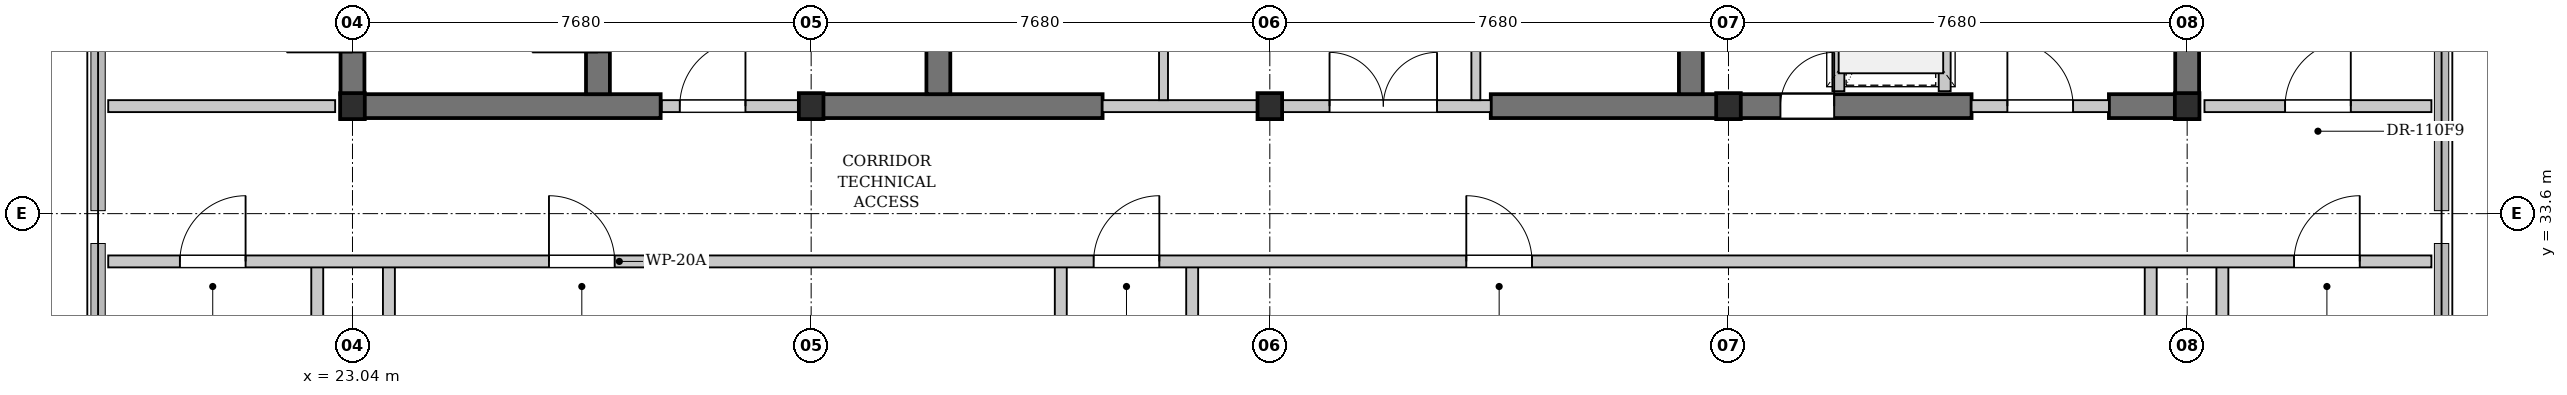
"""IFC4 building model, lengths in metres.
Left out: names, types, materials, properties, quantities, classifications, styles, units other than length and angle.
Written with IfcOpenShell. Run it as: python <this file> out.ifc"""

import sys

from ifc_helpers import new_model, si_unit, direction, frame, frame_2d, origin, origin_2d, place, context, subcontext, project, spatial, rectangle, i_section, extrude, element, fill, save


model = new_model("IFC4")
c1 = context("Model", 3, precision=1e-05, world=origin(), true_north=direction((0.0, 1.0)))
c2 = subcontext(c1, "Body", "Model", "MODEL_VIEW")
j1 = project(units=[si_unit("LENGTHUNIT", "METRE"), si_unit("PLANEANGLEUNIT", "RADIAN")], contexts=[c1])
p1 = place(None, origin())
s1 = spatial("IfcSite", under=j1, at=p1, CompositionType="ELEMENT")
p2 = place(p1, origin())
s2 = spatial("IfcBuilding", under=s1, at=p2, CompositionType="ELEMENT")
p3 = place(p2, frame((0.0, 0.0, 247.4)))
s3 = spatial("IfcBuildingStorey", under=s2, at=p3, CompositionType="ELEMENT", Elevation=247.4)
p4 = place(p3, frame((22.84, 35.4, 0.0), z_axis=(0.0, 0.0, 1.0), x_axis=(1.0, 0.0, 0.0)))
e1 = element("IfcWall", 1, at=p4, inside=s3, PredefinedType="SHEAR", context=c2, shape_type="SweptSolid", body=[
    extrude(rectangle(XDim=5.36, YDim=0.4, at=frame_2d((2.68, 0.0))), origin(), (0.0, 0.0, 1.0), 3.68),
])
p5 = place(p3, frame((30.72, 35.4, 0.0), z_axis=(0.0, 0.0, 1.0), x_axis=(1.0, 0.0, 0.0)))
e2 = element("IfcWall", 2, at=p5, inside=s3, PredefinedType="SHEAR", context=c2, shape_type="SweptSolid", body=[
    extrude(rectangle(XDim=4.88, YDim=0.4, at=frame_2d((2.44, 0.0))), origin(), (0.0, 0.0, 1.0), 3.68),
])
p6 = place(p3, frame((42.1, 35.4, 0.0), z_axis=(0.0, 0.0, 1.0), x_axis=(1.0, 0.0, 0.0)))
e3 = element("IfcWall", 3, at=p6, inside=s3, PredefinedType="SHEAR", context=c2, shape_type="SweptSolid", body=[
    extrude(rectangle(XDim=8.05, YDim=0.4, at=frame_2d((4.025, 0.0))), origin(), (0.0, 0.0, 1.0), 3.68),
])
p7 = place(p6, frame((4.85, 0.0, 0.0)))
e4 = element("IfcOpeningElement", 4, at=p7, cuts=e3, PredefinedType="OPENING", context=c2, shape_type="SweptSolid", body=[
    extrude(rectangle(XDim=0.9, YDim=2.15, at=frame_2d((0.45, 1.075))), frame((0.0, 0.21, 0.0), z_axis=(0.0, -1.0, 0.0), x_axis=(1.0, 0.0, 0.0)), (0.0, 0.0, 1.0), 0.42),
])
p8 = place(p3, frame((52.45, 35.4, 0.0), z_axis=(0.0, 0.0, 1.0), x_axis=(1.0, 0.0, 0.0)))
e5 = element("IfcWall", 5, at=p8, inside=s3, PredefinedType="SHEAR", context=c2, shape_type="SweptSolid", body=[
    extrude(rectangle(XDim=1.51, YDim=0.4, at=frame_2d((0.755, 0.0))), origin(), (0.0, 0.0, 1.0), 3.68),
])
p9 = place(p3, frame((23.04, 35.6, 0.0), z_axis=(0.0, 0.0, 1.0), x_axis=(0.0, 1.0, 0.0)))
e6 = element("IfcWall", 6, at=p9, inside=s3, PredefinedType="SHEAR", context=c2, shape_type="SweptSolid", body=[
    extrude(rectangle(XDim=10.4, YDim=0.4, at=frame_2d((5.2, 0.0))), origin(), (0.0, 0.0, 1.0), 3.68),
])
p10 = place(p9, frame((0.7, 0.0, 0.0)))
e7 = element("IfcOpeningElement", 7, at=p10, cuts=e6, PredefinedType="OPENING", context=c2, shape_type="SweptSolid", body=[
    extrude(rectangle(XDim=1.1, YDim=2.15, at=frame_2d((0.55, 1.075))), frame((0.0, 0.21, 0.0), z_axis=(0.0, -1.0, 0.0), x_axis=(1.0, 0.0, 0.0)), (0.0, 0.0, 1.0), 0.42),
])
p11 = place(p3, frame((27.15, 35.6, 0.0), z_axis=(0.0, 0.0, 1.0), x_axis=(0.0, 1.0, 0.0)))
e8 = element("IfcWall", 8, at=p11, inside=s3, PredefinedType="SHEAR", context=c2, shape_type="SweptSolid", body=[
    extrude(rectangle(XDim=10.4, YDim=0.4, at=frame_2d((5.2, 0.0))), origin(), (0.0, 0.0, 1.0), 3.68),
])
p12 = place(p11, frame((0.7, 0.0, 0.0)))
e9 = element("IfcOpeningElement", 9, at=p12, cuts=e8, PredefinedType="OPENING", context=c2, shape_type="SweptSolid", body=[
    extrude(rectangle(XDim=1.1, YDim=2.15, at=frame_2d((0.55, 1.075))), frame((0.0, 0.21, 0.0), z_axis=(0.0, -1.0, 0.0), x_axis=(1.0, 0.0, 0.0)), (0.0, 0.0, 1.0), 0.42),
])
for number, where, z_axis, x_axis in (
    (10, (32.85, 35.6, 0.0), (0.0, 0.0, 1.0), (0.0, 1.0, 0.0)),
    (11, (45.45, 35.6, 0.0), (0.0, 0.0, 1.0), (0.0, 1.0, 0.0)),
    (12, (53.76, 35.6, 0.0), (0.0, 0.0, 1.0), (0.0, 1.0, 0.0)),
):
    element("IfcWall", number, at=place(p3, frame(where, z_axis=z_axis, x_axis=x_axis)), inside=s3, PredefinedType="SHEAR", context=c2, shape_type="SweptSolid", body=[
        extrude(rectangle(XDim=10.4, YDim=0.4, at=frame_2d((5.2, 0.0))), origin(), (0.0, 0.0, 1.0), 3.68),
    ])
for number, where, z_axis, x_axis in (
    (13, (23.04, 35.4, 0.0), (0.0, 0.0, 1.0), (1.0, 0.0, 0.0)),
    (14, (30.72, 35.4, 0.0), (0.0, 0.0, 1.0), (1.0, 0.0, 0.0)),
    (15, (38.4, 35.4, 0.0), (0.0, 0.0, 1.0), (1.0, 0.0, 0.0)),
    (16, (46.08, 35.4, 0.0), (0.0, 0.0, 1.0), (1.0, 0.0, 0.0)),
    (17, (53.76, 35.4, 0.0), (0.0, 0.0, 1.0), (1.0, 0.0, 0.0)),
):
    element("IfcColumn", number, at=place(p3, frame(where, z_axis=z_axis, x_axis=x_axis)), inside=s3, PredefinedType="COLUMN", context=c2, shape_type="SweptSolid", body=[
        extrude(i_section(OverallWidth=0.412, OverallDepth=0.435, WebThickness=0.036, FlangeThickness=0.058, FilletRadius=0.015, at=origin_2d()), origin(), (0.0, 0.0, 1.0), 3.9),
    ])
p13 = place(p3, frame((28.22, 35.4, 0.0), z_axis=(0.0, 0.0, 1.0), x_axis=(1.0, 0.0, 0.0)))
e18 = element("IfcWall", 18, at=p13, inside=s3, PredefinedType="PARTITIONING", context=c2, shape_type="SweptSolid", body=[
    extrude(rectangle(XDim=2.5, YDim=0.2, at=frame_2d((1.25, 0.0))), origin(), (0.0, 0.0, 1.0), 2.861),
])
p14 = place(p13, frame((0.3, 0.0, 0.0)))
e19 = element("IfcOpeningElement", 19, at=p14, cuts=e18, PredefinedType="OPENING", context=c2, shape_type="SweptSolid", body=[
    extrude(rectangle(XDim=1.1, YDim=2.15, at=frame_2d((0.55, 1.075))), frame((0.0, 0.11, 0.0), z_axis=(0.0, -1.0, 0.0), x_axis=(1.0, 0.0, 0.0)), (0.0, 0.0, 1.0), 0.22),
])
p15 = place(p3, frame((35.6, 35.4, 0.0), z_axis=(0.0, 0.0, 1.0), x_axis=(1.0, 0.0, 0.0)))
e20 = element("IfcWall", 20, at=p15, inside=s3, PredefinedType="PARTITIONING", context=c2, shape_type="SweptSolid", body=[
    extrude(rectangle(XDim=6.5, YDim=0.2, at=frame_2d((3.25, 0.0))), origin(), (0.0, 0.0, 1.0), 2.861),
])
p16 = place(p15, frame((3.8, 0.0, 0.0)))
e21 = element("IfcOpeningElement", 21, at=p16, cuts=e20, PredefinedType="OPENING", context=c2, shape_type="SweptSolid", body=[
    extrude(rectangle(XDim=1.8, YDim=2.3, at=frame_2d((0.9, 1.15))), frame((0.0, 0.11, 0.0), z_axis=(0.0, -1.0, 0.0), x_axis=(1.0, 0.0, 0.0)), (0.0, 0.0, 1.0), 0.22),
])
p17 = place(p3, frame((36.62, 35.5, 0.0), z_axis=(0.0, 0.0, 1.0), x_axis=(0.0, 1.0, 0.0)))
e22 = element("IfcWall", 22, at=p17, inside=s3, PredefinedType="PARTITIONING", context=c2, shape_type="SweptSolid", body=[
    extrude(rectangle(XDim=10.42, YDim=0.15, at=frame_2d((5.21, 0.0))), origin(), (0.0, 0.0, 1.0), 3.68),
])
p18 = place(p17, frame((3.92, 0.0, 0.0)))
e23 = element("IfcOpeningElement", 23, at=p18, cuts=e22, PredefinedType="OPENING", context=c2, shape_type="SweptSolid", body=[
    extrude(rectangle(XDim=0.9, YDim=2.15, at=frame_2d((0.45, 1.075))), frame((0.0, 0.085, 0.0), z_axis=(0.0, -1.0, 0.0), x_axis=(1.0, 0.0, 0.0)), (0.0, 0.0, 1.0), 0.17),
])
p19 = place(p17, frame((5.85, 0.0, 0.0)))
e24 = element("IfcOpeningElement", 24, at=p19, cuts=e22, PredefinedType="OPENING", context=c2, shape_type="SweptSolid", body=[
    extrude(rectangle(XDim=0.9, YDim=2.15, at=frame_2d((0.45, 1.075))), frame((0.0, 0.085, 0.0), z_axis=(0.0, -1.0, 0.0), x_axis=(1.0, 0.0, 0.0)), (0.0, 0.0, 1.0), 0.17),
])
p20 = place(p3, frame((41.85, 35.5, 0.0), z_axis=(0.0, 0.0, 1.0), x_axis=(0.0, 1.0, 0.0)))
e25 = element("IfcWall", 25, at=p20, inside=s3, PredefinedType="PARTITIONING", context=c2, shape_type="SweptSolid", body=[
    extrude(rectangle(XDim=10.42, YDim=0.15, at=frame_2d((5.21, 0.0))), origin(), (0.0, 0.0, 1.0), 3.68),
])
p21 = place(p20, frame((3.92, 0.0, 0.0)))
e26 = element("IfcOpeningElement", 26, at=p21, cuts=e25, PredefinedType="OPENING", context=c2, shape_type="SweptSolid", body=[
    extrude(rectangle(XDim=0.9, YDim=2.15, at=frame_2d((0.45, 1.075))), frame((0.0, 0.085, 0.0), z_axis=(0.0, -1.0, 0.0), x_axis=(1.0, 0.0, 0.0)), (0.0, 0.0, 1.0), 0.17),
])
p22 = place(p20, frame((5.85, 0.0, 0.0)))
e27 = element("IfcOpeningElement", 27, at=p22, cuts=e25, PredefinedType="OPENING", context=c2, shape_type="SweptSolid", body=[
    extrude(rectangle(XDim=0.9, YDim=2.15, at=frame_2d((0.45, 1.075))), frame((0.0, 0.085, 0.0), z_axis=(0.0, -1.0, 0.0), x_axis=(1.0, 0.0, 0.0)), (0.0, 0.0, 1.0), 0.17),
])
p23 = place(p3, frame((50.15, 35.4, 0.0), z_axis=(0.0, 0.0, 1.0), x_axis=(1.0, 0.0, 0.0)))
e28 = element("IfcWall", 28, at=p23, inside=s3, PredefinedType="PARTITIONING", context=c2, shape_type="SweptSolid", body=[
    extrude(rectangle(XDim=2.3, YDim=0.2, at=frame_2d((1.15, 0.0))), origin(), (0.0, 0.0, 1.0), 2.861),
])
p24 = place(p23, frame((0.6, 0.0, 0.0)))
e29 = element("IfcOpeningElement", 29, at=p24, cuts=e28, PredefinedType="OPENING", context=c2, shape_type="SweptSolid", body=[
    extrude(rectangle(XDim=1.1, YDim=2.15, at=frame_2d((0.55, 1.075))), frame((0.0, 0.11, 0.0), z_axis=(0.0, -1.0, 0.0), x_axis=(1.0, 0.0, 0.0)), (0.0, 0.0, 1.0), 0.22),
])
p25 = place(p3, frame((49.7, 35.65, 0.0), z_axis=(0.0, 0.0, 1.0), x_axis=(0.0, 1.0, 0.0)))
e30 = element("IfcWall", 30, at=p25, inside=s3, PredefinedType="PARTITIONING", context=c2, shape_type="SweptSolid", body=[
    extrude(rectangle(XDim=3.15, YDim=0.2, at=frame_2d((1.575, 0.0))), origin(), (0.0, 0.0, 1.0), 3.68),
])
p26 = place(p25, frame((0.85, 0.0, 0.0)))
e31 = element("IfcOpeningElement", 31, at=p26, cuts=e30, PredefinedType="OPENING", context=c2, shape_type="SweptSolid", body=[
    extrude(rectangle(XDim=1.2, YDim=2.2, at=frame_2d((0.6, 1.1))), frame((0.0, 0.11, 0.0), z_axis=(0.0, -1.0, 0.0), x_axis=(1.0, 0.0, 0.0)), (0.0, 0.0, 1.0), 0.22),
])
p27 = place(p3, frame((47.92, 35.65, 0.0), z_axis=(0.0, 0.0, 1.0), x_axis=(0.0, 1.0, 0.0)))
e32 = element("IfcWall", 32, at=p27, inside=s3, PredefinedType="PARTITIONING", context=c2, shape_type="SweptSolid", body=[
    extrude(rectangle(XDim=3.15, YDim=0.2, at=frame_2d((1.575, 0.0))), origin(), (0.0, 0.0, 1.0), 3.68),
])
p28 = place(p3, frame((18.95, 35.4, 0.0), z_axis=(0.0, 0.0, 1.0), x_axis=(1.0, 0.0, 0.0)))
e33 = element("IfcWall", 33, at=p28, inside=s3, PredefinedType="PARTITIONING", context=c2, shape_type="SweptSolid", body=[
    extrude(rectangle(XDim=3.8, YDim=0.2, at=frame_2d((1.9, 0.0))), origin(), (0.0, 0.0, 1.0), 3.68),
])
p29 = place(p3, frame((54.05, 35.4, 0.0), z_axis=(0.0, 0.0, 1.0), x_axis=(1.0, 0.0, 0.0)))
e34 = element("IfcWall", 34, at=p29, inside=s3, PredefinedType="PARTITIONING", context=c2, shape_type="SweptSolid", body=[
    extrude(rectangle(XDim=3.8, YDim=0.2, at=frame_2d((1.9, 0.0))), origin(), (0.0, 0.0, 1.0), 3.68),
])
p30 = place(p29, frame((1.35, 0.0, 0.0)))
e35 = element("IfcOpeningElement", 35, at=p30, cuts=e34, PredefinedType="OPENING", context=c2, shape_type="SweptSolid", body=[
    extrude(rectangle(XDim=1.1, YDim=2.15, at=frame_2d((0.55, 1.075))), frame((0.0, 0.11, 0.0), z_axis=(0.0, -1.0, 0.0), x_axis=(1.0, 0.0, 0.0)), (0.0, 0.0, 1.0), 0.22),
])
for number, where, z_axis, x_axis in (
    (36, (22.45, 24.18, 0.0), (0.0, 0.0, 1.0), (0.0, 1.0, 0.0)),
    (37, (23.65, 24.18, 0.0), (0.0, 0.0, 1.0), (0.0, 1.0, 0.0)),
    (38, (53.15, 24.18, 0.0), (0.0, 0.0, 1.0), (0.0, 1.0, 0.0)),
    (39, (54.35, 24.18, 0.0), (0.0, 0.0, 1.0), (0.0, 1.0, 0.0)),
):
    element("IfcWall", number, at=place(p3, frame(where, z_axis=z_axis, x_axis=x_axis)), inside=s3, PredefinedType="PARTITIONING", context=c2, shape_type="SweptSolid", body=[
        extrude(rectangle(XDim=8.62, YDim=0.2, at=frame_2d((4.31, 0.0))), origin(), (0.0, 0.0, 1.0), 3.68),
    ])
for number, where, z_axis, x_axis in (
    (40, (34.9, 26.85, 0.0), (0.0, 0.0, 1.0), (0.0, 1.0, 0.0)),
    (41, (37.1, 26.85, 0.0), (0.0, 0.0, 1.0), (0.0, 1.0, 0.0)),
):
    element("IfcWall", number, at=place(p3, frame(where, z_axis=z_axis, x_axis=x_axis)), inside=s3, PredefinedType="PARTITIONING", context=c2, shape_type="SweptSolid", body=[
        extrude(rectangle(XDim=5.95, YDim=0.2, at=frame_2d((2.975, 0.0))), origin(), (0.0, 0.0, 1.0), 3.68),
    ])
p31 = place(p3, frame((18.95, 32.8, 0.0), z_axis=(0.0, 0.0, 1.0), x_axis=(1.0, 0.0, 0.0)))
e42 = element("IfcWall", 42, at=p31, inside=s3, PredefinedType="PARTITIONING", context=c2, shape_type="SweptSolid", body=[
    extrude(rectangle(XDim=38.9, YDim=0.2, at=frame_2d((19.45, 0.0))), origin(), (0.0, 0.0, 1.0), 3.68),
])
p32 = place(p31, frame((1.2, 0.0, 0.0)))
e43 = element("IfcOpeningElement", 43, at=p32, cuts=e42, PredefinedType="OPENING", context=c2, shape_type="SweptSolid", body=[
    extrude(rectangle(XDim=1.1, YDim=2.15, at=frame_2d((0.55, 1.075))), frame((0.0, 0.11, 0.0), z_axis=(0.0, -1.0, 0.0), x_axis=(1.0, 0.0, 0.0)), (0.0, 0.0, 1.0), 0.22),
])
p33 = place(p31, frame((7.38, 0.0, 0.0)))
e44 = element("IfcOpeningElement", 44, at=p33, cuts=e42, PredefinedType="OPENING", context=c2, shape_type="SweptSolid", body=[
    extrude(rectangle(XDim=1.1, YDim=2.15, at=frame_2d((0.55, 1.075))), frame((0.0, 0.11, 0.0), z_axis=(0.0, -1.0, 0.0), x_axis=(1.0, 0.0, 0.0)), (0.0, 0.0, 1.0), 0.22),
])
p34 = place(p31, frame((16.5, 0.0, 0.0)))
e45 = element("IfcOpeningElement", 45, at=p34, cuts=e42, PredefinedType="OPENING", context=c2, shape_type="SweptSolid", body=[
    extrude(rectangle(XDim=1.1, YDim=2.15, at=frame_2d((0.55, 1.075))), frame((0.0, 0.11, 0.0), z_axis=(0.0, -1.0, 0.0), x_axis=(1.0, 0.0, 0.0)), (0.0, 0.0, 1.0), 0.22),
])
p35 = place(p31, frame((22.74, 0.0, 0.0)))
e46 = element("IfcOpeningElement", 46, at=p35, cuts=e42, PredefinedType="OPENING", context=c2, shape_type="SweptSolid", body=[
    extrude(rectangle(XDim=1.1, YDim=2.15, at=frame_2d((0.55, 1.075))), frame((0.0, 0.11, 0.0), z_axis=(0.0, -1.0, 0.0), x_axis=(1.0, 0.0, 0.0)), (0.0, 0.0, 1.0), 0.22),
])
p36 = place(p31, frame((36.6, 0.0, 0.0)))
e47 = element("IfcOpeningElement", 47, at=p36, cuts=e42, PredefinedType="OPENING", context=c2, shape_type="SweptSolid", body=[
    extrude(rectangle(XDim=1.1, YDim=2.15, at=frame_2d((0.55, 1.075))), frame((0.0, 0.11, 0.0), z_axis=(0.0, -1.0, 0.0), x_axis=(1.0, 0.0, 0.0)), (0.0, 0.0, 1.0), 0.22),
])
p37 = place(p14, origin())
e48 = element("IfcDoor", 48, at=p37, inside=s3, OperationType="SINGLE_SWING_RIGHT", PredefinedType="DOOR", context=c2, shape_type="SweptSolid", body=[
    extrude(rectangle(XDim=1.1, YDim=2.15, at=frame_2d((0.55, 1.075))), frame((0.0, 0.025, 0.0), z_axis=(0.0, -1.0, 0.0), x_axis=(1.0, 0.0, 0.0)), (0.0, 0.0, 1.0), 0.05),
])
fill(e19, e48)
p38 = place(p16, origin())
e49 = element("IfcDoor", 49, at=p38, inside=s3, OperationType="DOUBLE_DOOR_SINGLE_SWING", PredefinedType="DOOR", context=c2, shape_type="SweptSolid", body=[
    extrude(rectangle(XDim=1.8, YDim=2.3, at=frame_2d((0.9, 1.15))), frame((0.0, 0.025, 0.0), z_axis=(0.0, -1.0, 0.0), x_axis=(1.0, 0.0, 0.0)), (0.0, 0.0, 1.0), 0.05),
])
fill(e21, e49)
p39 = place(p24, origin())
e50 = element("IfcDoor", 50, at=p39, inside=s3, OperationType="SINGLE_SWING_LEFT", PredefinedType="DOOR", context=c2, shape_type="SweptSolid", body=[
    extrude(rectangle(XDim=1.1, YDim=2.15, at=frame_2d((0.55, 1.075))), frame((0.0, 0.025, 0.0), z_axis=(0.0, -1.0, 0.0), x_axis=(1.0, 0.0, 0.0)), (0.0, 0.0, 1.0), 0.05),
])
fill(e29, e50)
p40 = place(p30, origin())
e51 = element("IfcDoor", 51, at=p40, inside=s3, OperationType="SINGLE_SWING_RIGHT", PredefinedType="DOOR", context=c2, shape_type="SweptSolid", body=[
    extrude(rectangle(XDim=1.1, YDim=2.15, at=frame_2d((0.55, 1.075))), frame((0.0, 0.025, 0.0), z_axis=(0.0, -1.0, 0.0), x_axis=(1.0, 0.0, 0.0)), (0.0, 0.0, 1.0), 0.05),
])
fill(e35, e51)
p41 = place(p32, origin())
e52 = element("IfcDoor", 52, at=p41, inside=s3, OperationType="SINGLE_SWING_RIGHT", PredefinedType="DOOR", context=c2, shape_type="SweptSolid", body=[
    extrude(rectangle(XDim=1.1, YDim=2.15, at=frame_2d((0.55, 1.075))), frame((0.0, 0.025, 0.0), z_axis=(0.0, -1.0, 0.0), x_axis=(1.0, 0.0, 0.0)), (0.0, 0.0, 1.0), 0.05),
])
fill(e43, e52)
p42 = place(p33, origin())
e53 = element("IfcDoor", 53, at=p42, inside=s3, OperationType="SINGLE_SWING_LEFT", PredefinedType="DOOR", context=c2, shape_type="SweptSolid", body=[
    extrude(rectangle(XDim=1.1, YDim=2.15, at=frame_2d((0.55, 1.075))), frame((0.0, 0.025, 0.0), z_axis=(0.0, -1.0, 0.0), x_axis=(1.0, 0.0, 0.0)), (0.0, 0.0, 1.0), 0.05),
])
fill(e44, e53)
p43 = place(p34, origin())
e54 = element("IfcDoor", 54, at=p43, inside=s3, OperationType="SINGLE_SWING_RIGHT", PredefinedType="DOOR", context=c2, shape_type="SweptSolid", body=[
    extrude(rectangle(XDim=1.1, YDim=2.15, at=frame_2d((0.55, 1.075))), frame((0.0, 0.025, 0.0), z_axis=(0.0, -1.0, 0.0), x_axis=(1.0, 0.0, 0.0)), (0.0, 0.0, 1.0), 0.05),
])
fill(e45, e54)
p44 = place(p35, origin())
e55 = element("IfcDoor", 55, at=p44, inside=s3, OperationType="SINGLE_SWING_LEFT", PredefinedType="DOOR", context=c2, shape_type="SweptSolid", body=[
    extrude(rectangle(XDim=1.1, YDim=2.15, at=frame_2d((0.55, 1.075))), frame((0.0, 0.025, 0.0), z_axis=(0.0, -1.0, 0.0), x_axis=(1.0, 0.0, 0.0)), (0.0, 0.0, 1.0), 0.05),
])
fill(e46, e55)
p45 = place(p36, origin())
e56 = element("IfcDoor", 56, at=p45, inside=s3, OperationType="SINGLE_SWING_RIGHT", PredefinedType="DOOR", context=c2, shape_type="SweptSolid", body=[
    extrude(rectangle(XDim=1.1, YDim=2.15, at=frame_2d((0.55, 1.075))), frame((0.0, 0.025, 0.0), z_axis=(0.0, -1.0, 0.0), x_axis=(1.0, 0.0, 0.0)), (0.0, 0.0, 1.0), 0.05),
])
fill(e47, e56)
p46 = place(p7, origin())
e57 = element("IfcDoor", 57, at=p46, inside=s3, OperationType="SINGLE_SWING_RIGHT", PredefinedType="DOOR", context=c2, shape_type="SweptSolid", body=[
    extrude(rectangle(XDim=0.9, YDim=2.15, at=frame_2d((0.45, 1.075))), frame((0.0, 0.025, 0.0), z_axis=(0.0, -1.0, 0.0), x_axis=(1.0, 0.0, 0.0)), (0.0, 0.0, 1.0), 0.05),
])
fill(e4, e57)
save(model, sys.argv[1])
